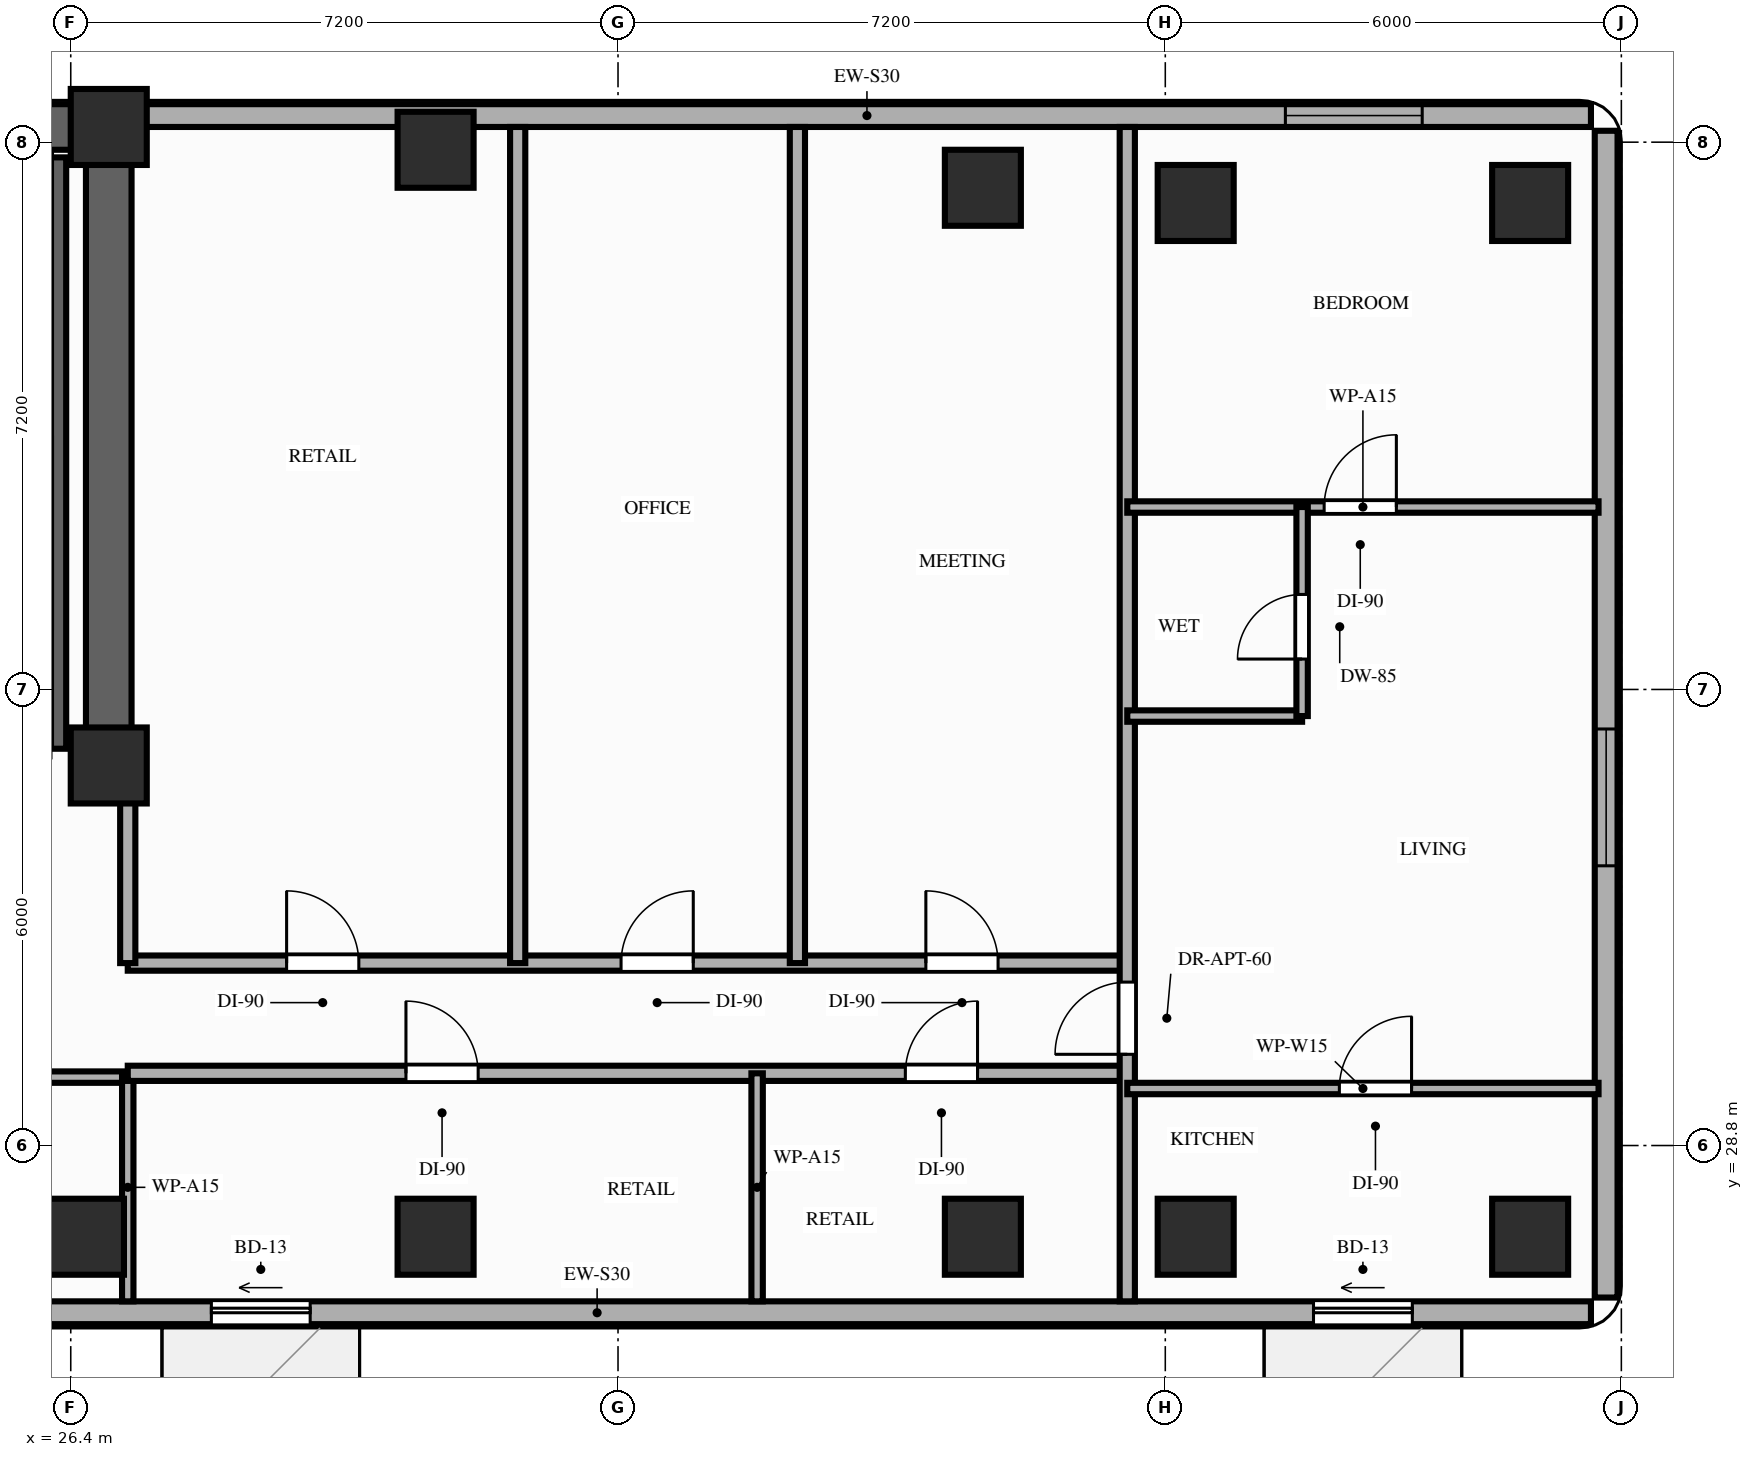
"""IFC4 building model, lengths in metres.
Left out: names, types, materials, properties, quantities, classifications, styles, units other than length and angle.
Written with IfcOpenShell. Run it as: python <this file> out.ifc"""

import sys

from ifc_helpers import new_model, si_unit, direction, frame, frame_2d, origin, origin_2d, place, context, subcontext, project, spatial, rectangle, extrude, element, fill, save


model = new_model("IFC4")
c1 = context("Model", 3, precision=1e-05, world=origin(), true_north=direction((0.0, 1.0)))
c2 = subcontext(c1, "Body", "Model", "MODEL_VIEW")
j1 = project(units=[si_unit("LENGTHUNIT", "METRE"), si_unit("PLANEANGLEUNIT", "RADIAN")], contexts=[c1])
p1 = place(None, origin())
s1 = spatial("IfcSite", under=j1, at=p1, CompositionType="ELEMENT")
p2 = place(p1, origin())
s2 = spatial("IfcBuilding", under=s1, at=p2, CompositionType="ELEMENT")
p3 = place(p2, frame((0.0, 0.0, 117.0)))
s3 = spatial("IfcBuildingStorey", under=s2, at=p3, CompositionType="ELEMENT", Elevation=117.0)
for number, where, z_axis, x_axis in (
    (1, (26.9, 33.8, 0.0), (0.0, 0.0, 1.0), (1.0, 0.0, 0.0)),
    (2, (26.9, 42.2, 0.0), (0.0, 0.0, 1.0), (1.0, 0.0, 0.0)),
    (3, (26.6, 27.6, 0.0), (0.0, 0.0, 1.0), (1.0, 0.0, 0.0)),
    (4, (31.2, 27.6, 0.0), (0.0, 0.0, 1.0), (1.0, 0.0, 0.0)),
    (5, (31.2, 41.9, 0.0), (0.0, 0.0, 1.0), (1.0, 0.0, 0.0)),
    (6, (38.4, 27.6, 0.0), (0.0, 0.0, 1.0), (1.0, 0.0, 0.0)),
    (7, (38.4, 41.4, 0.0), (0.0, 0.0, 1.0), (1.0, 0.0, 0.0)),
    (8, (41.2, 27.6, 0.0), (0.0, 0.0, 1.0), (1.0, 0.0, 0.0)),
    (9, (41.2, 41.2, 0.0), (0.0, 0.0, 1.0), (1.0, 0.0, 0.0)),
    (10, (45.6, 27.6, 0.0), (0.0, 0.0, 1.0), (1.0, 0.0, 0.0)),
    (11, (45.6, 41.2, 0.0), (0.0, 0.0, 1.0), (1.0, 0.0, 0.0)),
):
    element("IfcColumn", number, at=place(p3, frame(where, z_axis=z_axis, x_axis=x_axis)), inside=s3, PredefinedType="COLUMN", context=c2, shape_type="SweptSolid", body=[
        extrude(rectangle(XDim=1.0, YDim=1.0, at=origin_2d()), origin(), (0.0, 0.0, 1.0), 3.2),
    ])
p4 = place(p3, frame((46.4, 42.35, 0.0), z_axis=(0.0, 0.0, 1.0), x_axis=(-1.0, 0.0, 0.0)))
e12 = element("IfcWall", 12, at=p4, inside=s3, PredefinedType="STANDARD", context=c2, shape_type="SweptSolid", body=[
    extrude(rectangle(XDim=19.05, YDim=0.3, at=frame_2d((9.525, 0.0))), origin(), (0.0, 0.0, 1.0), 2.41),
])
p5 = place(p4, frame((2.22, 0.0, 0.85)))
e13 = element("IfcOpeningElement", 13, at=p5, cuts=e12, PredefinedType="OPENING", context=c2, shape_type="SweptSolid", body=[
    extrude(rectangle(XDim=1.8, YDim=1.31, at=frame_2d((0.9, 0.655))), frame((0.0, 0.16, 0.0), z_axis=(0.0, -1.0, 0.0), x_axis=(1.0, 0.0, 0.0)), (0.0, 0.0, 1.0), 0.32),
])
p6 = place(p3, frame((20.25, 26.6, 0.0), z_axis=(0.0, 0.0, 1.0), x_axis=(1.0, 0.0, 0.0)))
e14 = element("IfcWall", 14, at=p6, inside=s3, PredefinedType="STANDARD", context=c2, shape_type="SweptSolid", body=[
    extrude(rectangle(XDim=26.15, YDim=0.3, at=frame_2d((13.075, 0.0))), origin(), (0.0, 0.0, 1.0), 2.7),
])
p7 = place(p6, frame((8.0, 0.0, 0.0)))
e15 = element("IfcOpeningElement", 15, at=p7, cuts=e14, PredefinedType="OPENING", context=c2, shape_type="SweptSolid", body=[
    extrude(rectangle(XDim=1.3, YDim=2.08, at=frame_2d((0.65, 1.04))), frame((0.0, 0.16, 0.0), z_axis=(0.0, -1.0, 0.0), x_axis=(1.0, 0.0, 0.0)), (0.0, 0.0, 1.0), 0.32),
])
p8 = place(p6, frame((22.5, 0.0, 0.0)))
e16 = element("IfcOpeningElement", 16, at=p8, cuts=e14, PredefinedType="OPENING", context=c2, shape_type="SweptSolid", body=[
    extrude(rectangle(XDim=1.3, YDim=2.08, at=frame_2d((0.65, 1.04))), frame((0.0, 0.16, 0.0), z_axis=(0.0, -1.0, 0.0), x_axis=(1.0, 0.0, 0.0)), (0.0, 0.0, 1.0), 0.32),
])
p9 = place(p6, frame((2.25, 0.0, 0.85)))
e17 = element("IfcOpeningElement", 17, at=p9, cuts=e14, PredefinedType="OPENING", context=c2, shape_type="SweptSolid", body=[
    extrude(rectangle(XDim=1.8, YDim=1.6, at=frame_2d((0.9, 0.8))), frame((0.0, 0.16, 0.0), z_axis=(0.0, -1.0, 0.0), x_axis=(1.0, 0.0, 0.0)), (0.0, 0.0, 1.0), 0.32),
])
p10 = place(p3, frame((46.6, 26.8, 0.0), z_axis=(0.0, 0.0, 1.0), x_axis=(0.0, 1.0, 0.0)))
e18 = element("IfcWall", 18, at=p10, inside=s3, PredefinedType="STANDARD", context=c2, shape_type="SweptSolid", body=[
    extrude(rectangle(XDim=15.35, YDim=0.3, at=frame_2d((7.675, 0.0))), origin(), (0.0, 0.0, 1.0), 3.02),
])
p11 = place(p10, frame((5.68, 0.0, 0.85)))
e19 = element("IfcOpeningElement", 19, at=p11, cuts=e18, PredefinedType="OPENING", context=c2, shape_type="SweptSolid", body=[
    extrude(rectangle(XDim=1.8, YDim=1.75, at=frame_2d((0.9, 0.875))), frame((0.0, 0.16, 0.0), z_axis=(0.0, -1.0, 0.0), x_axis=(1.0, 0.0, 0.0)), (0.0, 0.0, 1.0), 0.32),
])
p12 = place(p3, frame((6.45, 42.2, 0.0), z_axis=(0.0, 0.0, 1.0), x_axis=(1.0, 0.0, 0.0)))
e20 = element("IfcWall", 20, at=p12, inside=s3, PredefinedType="SHEAR", context=c2, shape_type="SweptSolid", body=[
    extrude(rectangle(XDim=20.45, YDim=0.6, at=frame_2d((10.225, 0.0))), origin(), (0.0, 0.0, 1.0), 3.02),
])
p13 = place(p3, frame((26.9, 33.8, 0.0), z_axis=(0.0, 0.0, 1.0), x_axis=(0.0, 1.0, 0.0)))
e21 = element("IfcWall", 21, at=p13, inside=s3, PredefinedType="SHEAR", context=c2, shape_type="SweptSolid", body=[
    extrude(rectangle(XDim=7.95, YDim=0.6, at=frame_2d((3.975, 0.0))), origin(), (0.0, 0.0, 1.0), 3.02),
])
p14 = place(p3, frame((26.24, 34.02, 0.0), z_axis=(0.0, 0.0, 1.0), x_axis=(0.0, 1.0, 0.0)))
e22 = element("IfcWall", 22, at=p14, inside=s3, PredefinedType="SHEAR", context=c2, shape_type="SweptSolid", body=[
    extrude(rectangle(XDim=7.78, YDim=0.2, at=frame_2d((3.89, 0.0))), origin(), (0.0, 0.0, 1.0), 3.02),
])
p15 = place(p3, frame((20.45, 29.7, 0.0), z_axis=(0.0, 0.0, 1.0), x_axis=(1.0, 0.0, 0.0)))
e23 = element("IfcWall", 23, at=p15, inside=s3, PredefinedType="PARTITIONING", context=c2, shape_type="SweptSolid", body=[
    extrude(rectangle(XDim=6.7, YDim=0.15, at=frame_2d((3.35, 0.0))), origin(), (0.0, 0.0, 1.0), 3.02),
])
p16 = place(p15, frame((2.8, 0.0, 0.0)))
e24 = element("IfcOpeningElement", 24, at=p16, cuts=e23, PredefinedType="OPENING", context=c2, shape_type="SweptSolid", body=[
    extrude(rectangle(XDim=0.95, YDim=2.15, at=frame_2d((0.475, 1.075))), frame((0.0, 0.085, 0.0), z_axis=(0.0, -1.0, 0.0), x_axis=(1.0, 0.0, 0.0)), (0.0, 0.0, 1.0), 0.17),
])
p17 = place(p3, frame((27.15, 26.75, 0.0), z_axis=(0.0, 0.0, 1.0), x_axis=(0.0, 1.0, 0.0)))
e25 = element("IfcWall", 25, at=p17, inside=s3, PredefinedType="PARTITIONING", context=c2, shape_type="SweptSolid", body=[
    extrude(rectangle(XDim=3.0, YDim=0.15, at=frame_2d((1.5, 0.0))), origin(), (0.0, 0.0, 1.0), 2.41),
])
p18 = place(p3, frame((27.15, 29.75, 0.0), z_axis=(0.0, 0.0, 1.0), x_axis=(1.0, 0.0, 0.0)))
e26 = element("IfcWall", 26, at=p18, inside=s3, PredefinedType="PARTITIONING", context=c2, shape_type="SweptSolid", body=[
    extrude(rectangle(XDim=13.15, YDim=0.2, at=frame_2d((6.575, 0.0))), origin(), (0.0, 0.0, 1.0), 2.41),
])
p19 = place(p18, frame((3.66, 0.0, 0.0)))
e27 = element("IfcOpeningElement", 27, at=p19, cuts=e26, PredefinedType="OPENING", context=c2, shape_type="SweptSolid", body=[
    extrude(rectangle(XDim=0.95, YDim=2.15, at=frame_2d((0.475, 1.075))), frame((0.0, 0.11, 0.0), z_axis=(0.0, -1.0, 0.0), x_axis=(1.0, 0.0, 0.0)), (0.0, 0.0, 1.0), 0.22),
])
p20 = place(p18, frame((10.23, 0.0, 0.0)))
e28 = element("IfcOpeningElement", 28, at=p20, cuts=e26, PredefinedType="OPENING", context=c2, shape_type="SweptSolid", body=[
    extrude(rectangle(XDim=0.95, YDim=2.15, at=frame_2d((0.475, 1.075))), frame((0.0, 0.11, 0.0), z_axis=(0.0, -1.0, 0.0), x_axis=(1.0, 0.0, 0.0)), (0.0, 0.0, 1.0), 0.22),
])
p21 = place(p3, frame((27.15, 31.2, 0.0), z_axis=(0.0, 0.0, 1.0), x_axis=(1.0, 0.0, 0.0)))
e29 = element("IfcWall", 29, at=p21, inside=s3, PredefinedType="PARTITIONING", context=c2, shape_type="SweptSolid", body=[
    extrude(rectangle(XDim=13.15, YDim=0.2, at=frame_2d((6.575, 0.0))), origin(), (0.0, 0.0, 1.0), 2.41),
])
p22 = place(p21, frame((2.09, 0.0, 0.0)))
e30 = element("IfcOpeningElement", 30, at=p22, cuts=e29, PredefinedType="OPENING", context=c2, shape_type="SweptSolid", body=[
    extrude(rectangle(XDim=0.95, YDim=2.15, at=frame_2d((0.475, 1.075))), frame((0.0, 0.11, 0.0), z_axis=(0.0, -1.0, 0.0), x_axis=(1.0, 0.0, 0.0)), (0.0, 0.0, 1.0), 0.22),
])
p23 = place(p21, frame((6.49, 0.0, 0.0)))
e31 = element("IfcOpeningElement", 31, at=p23, cuts=e29, PredefinedType="OPENING", context=c2, shape_type="SweptSolid", body=[
    extrude(rectangle(XDim=0.95, YDim=2.15, at=frame_2d((0.475, 1.075))), frame((0.0, 0.11, 0.0), z_axis=(0.0, -1.0, 0.0), x_axis=(1.0, 0.0, 0.0)), (0.0, 0.0, 1.0), 0.22),
])
p24 = place(p21, frame((10.5, 0.0, 0.0)))
e32 = element("IfcOpeningElement", 32, at=p24, cuts=e29, PredefinedType="OPENING", context=c2, shape_type="SweptSolid", body=[
    extrude(rectangle(XDim=0.95, YDim=2.15, at=frame_2d((0.475, 1.075))), frame((0.0, 0.11, 0.0), z_axis=(0.0, -1.0, 0.0), x_axis=(1.0, 0.0, 0.0)), (0.0, 0.0, 1.0), 0.22),
])
p25 = place(p3, frame((27.15, 31.2, 0.0), z_axis=(0.0, 0.0, 1.0), x_axis=(0.0, 1.0, 0.0)))
e33 = element("IfcWall", 33, at=p25, inside=s3, PredefinedType="PARTITIONING", context=c2, shape_type="SweptSolid", body=[
    extrude(rectangle(XDim=2.48, YDim=0.2, at=frame_2d((1.24, 0.0))), origin(), (0.0, 0.0, 1.0), 2.41),
])
p26 = place(p3, frame((40.3, 26.75, 0.0), z_axis=(0.0, 0.0, 1.0), x_axis=(0.0, 1.0, 0.0)))
e34 = element("IfcWall", 34, at=p26, inside=s3, PredefinedType="PARTITIONING", context=c2, shape_type="SweptSolid", body=[
    extrude(rectangle(XDim=15.45, YDim=0.2, at=frame_2d((7.725, 0.0))), origin(), (0.0, 0.0, 1.0), 2.41),
])
p27 = place(p26, frame((3.25, 0.0, 0.0)))
e35 = element("IfcOpeningElement", 35, at=p27, cuts=e34, PredefinedType="OPENING", context=c2, shape_type="SweptSolid", body=[
    extrude(rectangle(XDim=0.95, YDim=2.15, at=frame_2d((0.475, 1.075))), frame((0.0, 0.11, 0.0), z_axis=(0.0, -1.0, 0.0), x_axis=(1.0, 0.0, 0.0)), (0.0, 0.0, 1.0), 0.22),
])
p28 = place(p3, frame((40.3, 29.55, 0.0), z_axis=(0.0, 0.0, 1.0), x_axis=(1.0, 0.0, 0.0)))
e36 = element("IfcWall", 36, at=p28, inside=s3, PredefinedType="PARTITIONING", context=c2, shape_type="SweptSolid", body=[
    extrude(rectangle(XDim=6.2, YDim=0.15, at=frame_2d((3.1, 0.0))), origin(), (0.0, 0.0, 1.0), 2.41),
])
p29 = place(p28, frame((2.79, 0.0, 0.0)))
e37 = element("IfcOpeningElement", 37, at=p29, cuts=e36, PredefinedType="OPENING", context=c2, shape_type="SweptSolid", body=[
    extrude(rectangle(XDim=0.95, YDim=2.15, at=frame_2d((0.475, 1.075))), frame((0.0, 0.085, 0.0), z_axis=(0.0, -1.0, 0.0), x_axis=(1.0, 0.0, 0.0)), (0.0, 0.0, 1.0), 0.17),
])
p30 = place(p3, frame((40.3, 37.2, 0.0), z_axis=(0.0, 0.0, 1.0), x_axis=(1.0, 0.0, 0.0)))
e38 = element("IfcWall", 38, at=p30, inside=s3, PredefinedType="PARTITIONING", context=c2, shape_type="SweptSolid", body=[
    extrude(rectangle(XDim=6.2, YDim=0.15, at=frame_2d((3.1, 0.0))), origin(), (0.0, 0.0, 1.0), 2.41),
])
p31 = place(p30, frame((2.59, 0.0, 0.0)))
e39 = element("IfcOpeningElement", 39, at=p31, cuts=e38, PredefinedType="OPENING", context=c2, shape_type="SweptSolid", body=[
    extrude(rectangle(XDim=0.95, YDim=2.15, at=frame_2d((0.475, 1.075))), frame((0.0, 0.085, 0.0), z_axis=(0.0, -1.0, 0.0), x_axis=(1.0, 0.0, 0.0)), (0.0, 0.0, 1.0), 0.17),
])
p32 = place(p3, frame((40.3, 34.45, 0.0), z_axis=(0.0, 0.0, 1.0), x_axis=(1.0, 0.0, 0.0)))
e40 = element("IfcWall", 40, at=p32, inside=s3, PredefinedType="PARTITIONING", context=c2, shape_type="SweptSolid", body=[
    extrude(rectangle(XDim=2.3, YDim=0.15, at=frame_2d((1.15, 0.0))), origin(), (0.0, 0.0, 1.0), 2.41),
])
p33 = place(p3, frame((42.6, 34.45, 0.0), z_axis=(0.0, 0.0, 1.0), x_axis=(0.0, 1.0, 0.0)))
e41 = element("IfcWall", 41, at=p33, inside=s3, PredefinedType="PARTITIONING", context=c2, shape_type="SweptSolid", body=[
    extrude(rectangle(XDim=2.75, YDim=0.15, at=frame_2d((1.375, 0.0))), origin(), (0.0, 0.0, 1.0), 2.6),
])
p34 = place(p33, frame((0.75, 0.0, 0.0)))
e42 = element("IfcOpeningElement", 42, at=p34, cuts=e41, PredefinedType="OPENING", context=c2, shape_type="SweptSolid", body=[
    extrude(rectangle(XDim=0.85, YDim=2.1, at=frame_2d((0.425, 1.05))), frame((0.0, 0.085, 0.0), z_axis=(0.0, -1.0, 0.0), x_axis=(1.0, 0.0, 0.0)), (0.0, 0.0, 1.0), 0.17),
])
p35 = place(p3, frame((35.43, 26.75, 0.0), z_axis=(0.0, 0.0, 1.0), x_axis=(0.0, 1.0, 0.0)))
e43 = element("IfcWall", 43, at=p35, inside=s3, PredefinedType="PARTITIONING", context=c2, shape_type="SweptSolid", body=[
    extrude(rectangle(XDim=3.0, YDim=0.15, at=frame_2d((1.5, 0.0))), origin(), (0.0, 0.0, 1.0), 2.41),
])
for number, where, z_axis, x_axis in (
    (44, (32.28, 31.2, 0.0), (0.0, 0.0, 1.0), (0.0, 1.0, 0.0)),
    (45, (35.96, 31.2, 0.0), (0.0, 0.0, 1.0), (0.0, 1.0, 0.0)),
):
    element("IfcWall", number, at=place(p3, frame(where, z_axis=z_axis, x_axis=x_axis)), inside=s3, PredefinedType="PARTITIONING", context=c2, shape_type="SweptSolid", body=[
        extrude(rectangle(XDim=11.0, YDim=0.2, at=frame_2d((5.5, 0.0))), origin(), (0.0, 0.0, 1.0), 2.41),
    ])
p36 = place(p7, origin())
e46 = element("IfcDoor", 46, at=p36, inside=s3, OperationType="SLIDING_TO_LEFT", PredefinedType="DOOR", context=c2, shape_type="SweptSolid", body=[
    extrude(rectangle(XDim=1.3, YDim=2.08, at=frame_2d((0.65, 1.04))), frame((0.0, 0.025, 0.0), z_axis=(0.0, -1.0, 0.0), x_axis=(1.0, 0.0, 0.0)), (0.0, 0.0, 1.0), 0.05),
])
fill(e15, e46)
p37 = place(p8, origin())
e47 = element("IfcDoor", 47, at=p37, inside=s3, OperationType="SLIDING_TO_LEFT", PredefinedType="DOOR", context=c2, shape_type="SweptSolid", body=[
    extrude(rectangle(XDim=1.3, YDim=2.08, at=frame_2d((0.65, 1.04))), frame((0.0, 0.025, 0.0), z_axis=(0.0, -1.0, 0.0), x_axis=(1.0, 0.0, 0.0)), (0.0, 0.0, 1.0), 0.05),
])
fill(e16, e47)
p38 = place(p11, origin())
e48 = element("IfcWindow", 48, at=p38, inside=s3, PartitioningType="SINGLE_PANEL", PredefinedType="WINDOW", context=c2, shape_type="SweptSolid", body=[
    extrude(rectangle(XDim=1.8, YDim=1.75, at=frame_2d((0.9, 0.875))), frame((0.0, 0.03, 0.0), z_axis=(0.0, -1.0, 0.0), x_axis=(1.0, 0.0, 0.0)), (0.0, 0.0, 1.0), 0.06),
])
fill(e19, e48)
p39 = place(p5, origin())
e49 = element("IfcWindow", 49, at=p39, inside=s3, PartitioningType="SINGLE_PANEL", PredefinedType="WINDOW", context=c2, shape_type="SweptSolid", body=[
    extrude(rectangle(XDim=1.8, YDim=1.31, at=frame_2d((0.9, 0.655))), frame((0.0, 0.03, 0.0), z_axis=(0.0, -1.0, 0.0), x_axis=(1.0, 0.0, 0.0)), (0.0, 0.0, 1.0), 0.06),
])
fill(e13, e49)
p40 = place(p27, origin())
e50 = element("IfcDoor", 50, at=p40, inside=s3, OperationType="SINGLE_SWING_LEFT", PredefinedType="DOOR", context=c2, shape_type="SweptSolid", body=[
    extrude(rectangle(XDim=0.95, YDim=2.15, at=frame_2d((0.475, 1.075))), frame((0.0, 0.025, 0.0), z_axis=(0.0, -1.0, 0.0), x_axis=(1.0, 0.0, 0.0)), (0.0, 0.0, 1.0), 0.05),
])
fill(e35, e50)
p41 = place(p31, origin())
e51 = element("IfcDoor", 51, at=p41, inside=s3, OperationType="SINGLE_SWING_RIGHT", PredefinedType="DOOR", context=c2, shape_type="SweptSolid", body=[
    extrude(rectangle(XDim=0.95, YDim=2.15, at=frame_2d((0.475, 1.075))), frame((0.0, 0.025, 0.0), z_axis=(0.0, -1.0, 0.0), x_axis=(1.0, 0.0, 0.0)), (0.0, 0.0, 1.0), 0.05),
])
fill(e39, e51)
p42 = place(p34, origin())
e52 = element("IfcDoor", 52, at=p42, inside=s3, OperationType="SINGLE_SWING_LEFT", PredefinedType="DOOR", context=c2, shape_type="SweptSolid", body=[
    extrude(rectangle(XDim=0.85, YDim=2.1, at=frame_2d((0.425, 1.05))), frame((0.0, 0.025, 0.0), z_axis=(0.0, -1.0, 0.0), x_axis=(1.0, 0.0, 0.0)), (0.0, 0.0, 1.0), 0.05),
])
fill(e42, e52)
p43 = place(p29, origin())
e53 = element("IfcDoor", 53, at=p43, inside=s3, OperationType="SINGLE_SWING_RIGHT", PredefinedType="DOOR", context=c2, shape_type="SweptSolid", body=[
    extrude(rectangle(XDim=0.95, YDim=2.15, at=frame_2d((0.475, 1.075))), frame((0.0, 0.025, 0.0), z_axis=(0.0, -1.0, 0.0), x_axis=(1.0, 0.0, 0.0)), (0.0, 0.0, 1.0), 0.05),
])
fill(e37, e53)
p44 = place(p19, origin())
e54 = element("IfcDoor", 54, at=p44, inside=s3, OperationType="SINGLE_SWING_LEFT", PredefinedType="DOOR", context=c2, shape_type="SweptSolid", body=[
    extrude(rectangle(XDim=0.95, YDim=2.15, at=frame_2d((0.475, 1.075))), frame((0.0, 0.025, 0.0), z_axis=(0.0, -1.0, 0.0), x_axis=(1.0, 0.0, 0.0)), (0.0, 0.0, 1.0), 0.05),
])
fill(e27, e54)
p45 = place(p20, origin())
e55 = element("IfcDoor", 55, at=p45, inside=s3, OperationType="SINGLE_SWING_RIGHT", PredefinedType="DOOR", context=c2, shape_type="SweptSolid", body=[
    extrude(rectangle(XDim=0.95, YDim=2.15, at=frame_2d((0.475, 1.075))), frame((0.0, 0.025, 0.0), z_axis=(0.0, -1.0, 0.0), x_axis=(1.0, 0.0, 0.0)), (0.0, 0.0, 1.0), 0.05),
])
fill(e28, e55)
p46 = place(p22, origin())
e56 = element("IfcDoor", 56, at=p46, inside=s3, OperationType="SINGLE_SWING_LEFT", PredefinedType="DOOR", context=c2, shape_type="SweptSolid", body=[
    extrude(rectangle(XDim=0.95, YDim=2.15, at=frame_2d((0.475, 1.075))), frame((0.0, 0.025, 0.0), z_axis=(0.0, -1.0, 0.0), x_axis=(1.0, 0.0, 0.0)), (0.0, 0.0, 1.0), 0.05),
])
fill(e30, e56)
p47 = place(p23, origin())
e57 = element("IfcDoor", 57, at=p47, inside=s3, OperationType="SINGLE_SWING_RIGHT", PredefinedType="DOOR", context=c2, shape_type="SweptSolid", body=[
    extrude(rectangle(XDim=0.95, YDim=2.15, at=frame_2d((0.475, 1.075))), frame((0.0, 0.025, 0.0), z_axis=(0.0, -1.0, 0.0), x_axis=(1.0, 0.0, 0.0)), (0.0, 0.0, 1.0), 0.05),
])
fill(e31, e57)
p48 = place(p24, origin())
e58 = element("IfcDoor", 58, at=p48, inside=s3, OperationType="SINGLE_SWING_LEFT", PredefinedType="DOOR", context=c2, shape_type="SweptSolid", body=[
    extrude(rectangle(XDim=0.95, YDim=2.15, at=frame_2d((0.475, 1.075))), frame((0.0, 0.025, 0.0), z_axis=(0.0, -1.0, 0.0), x_axis=(1.0, 0.0, 0.0)), (0.0, 0.0, 1.0), 0.05),
])
fill(e32, e58)
save(model, sys.argv[1])
